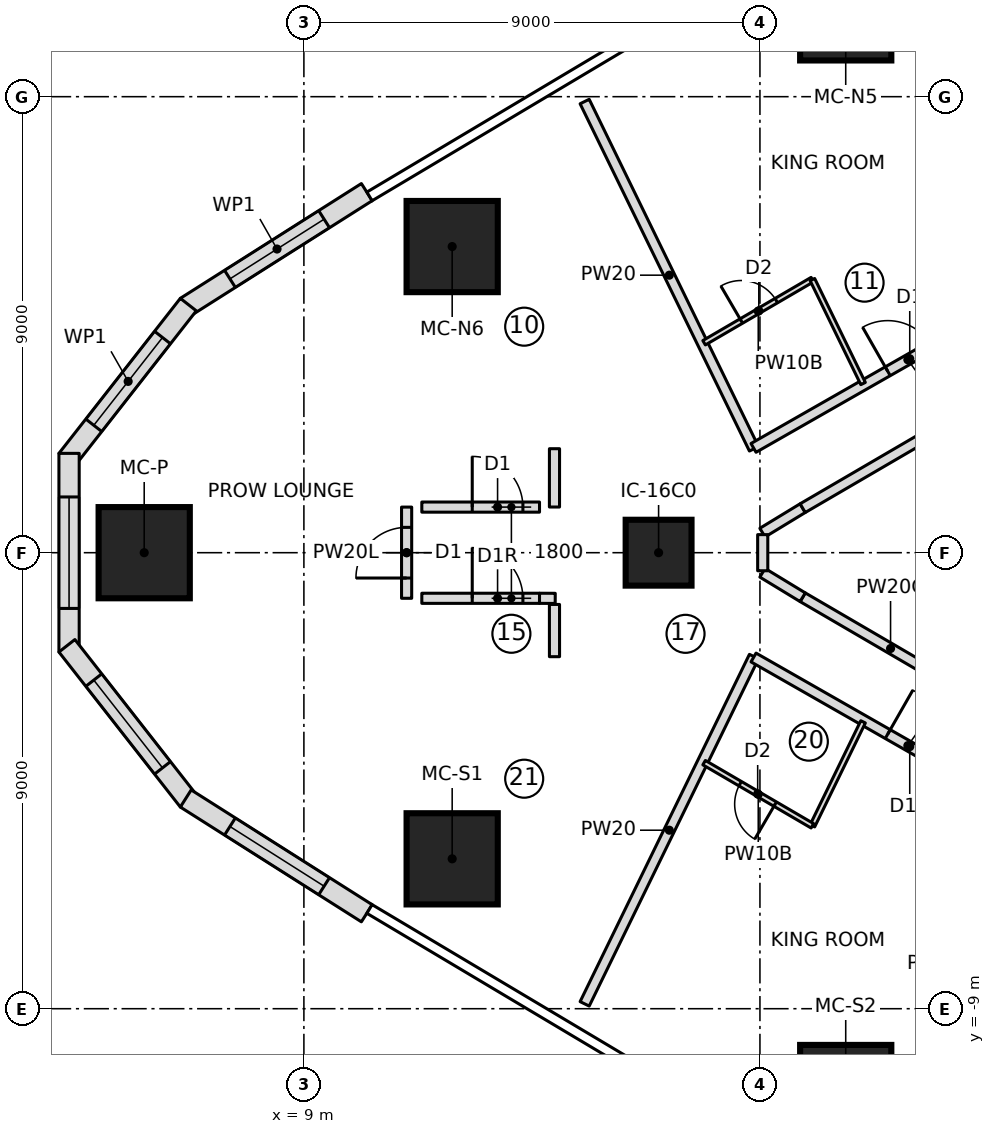
"""IFC4 building model, lengths in metres.
Left out: names, types, materials, properties, quantities, classifications, styles, units other than length and angle.
Written with IfcOpenShell. Run it as: python <this file> out.ifc"""

import sys

from ifc_helpers import new_model, si_unit, direction, frame, frame_2d, origin, origin_2d, place, context, subcontext, project, spatial, polyline, rectangle, outline, extrude, element, fill, save


model = new_model("IFC4")
c1 = context("Model", 3, precision=1e-05, world=origin(), true_north=direction((0.0, 1.0)))
c2 = subcontext(c1, "Body", "Model", "MODEL_VIEW")
j1 = project(units=[si_unit("LENGTHUNIT", "METRE"), si_unit("PLANEANGLEUNIT", "RADIAN")], contexts=[c1])
p1 = place(None, origin())
s1 = spatial("IfcSite", under=j1, at=p1, CompositionType="ELEMENT")
p2 = place(p1, origin())
s2 = spatial("IfcBuilding", under=s1, at=p2, CompositionType="ELEMENT")
p3 = place(p2, frame((0.0, 0.0, 68.0)))
s3 = spatial("IfcBuildingStorey", under=s2, at=p3, CompositionType="ELEMENT", Elevation=68.0)
for number, where, z_axis, x_axis in (
    (1, (5.848, 0.0, 0.0), (0.0, 0.0, 1.0), (1.0, 0.0, 0.0)),
    (2, (11.927, -6.042, 0.0), (0.0, 0.0, 1.0), (1.0, 0.0, 0.0)),
    (3, (19.693, -10.615, 0.0), (0.0, 0.0, 1.0), (1.0, 0.0, 0.0)),
    (4, (19.693, 10.615, 0.0), (0.0, 0.0, 1.0), (1.0, 0.0, 0.0)),
    (5, (11.927, 6.042, 0.0), (0.0, 0.0, 1.0), (1.0, 0.0, 0.0)),
):
    element("IfcColumn", number, at=place(p3, frame(where, z_axis=z_axis, x_axis=x_axis)), inside=s3, PredefinedType="COLUMN", context=c2, shape_type="SweptSolid", body=[
        extrude(rectangle(XDim=1.8, YDim=1.8, at=origin_2d()), origin(), (0.0, 0.0, 1.0), 3.55),
    ])
p4 = place(p3, frame((16.0, 0.0, 0.0), z_axis=(0.0, 0.0, 1.0), x_axis=(1.0, 0.0, 0.0)))
e6 = element("IfcColumn", 6, at=p4, inside=s3, PredefinedType="COLUMN", context=c2, shape_type="SweptSolid", body=[
    extrude(rectangle(XDim=1.3, YDim=1.3, at=origin_2d()), origin(), (0.0, 0.0, 1.0), 3.55),
])
p5 = place(p3, frame((10.242, 7.116, 0.0), z_axis=(0.0, 0.0, 1.0), x_axis=(-0.844551578623, -0.535474211372, 0.0)))
e7 = element("IfcWall", 7, at=p5, inside=s3, PredefinedType="NOTDEFINED", context=c2, shape_type="SweptSolid", body=[
    extrude(outline(polyline([(0.0, -0.2), (4.23, -0.2), (4.162, 0.2), (0.0, 0.2), (0.0, -0.2)])), origin(), (0.0, 0.0, 1.0), 3.25),
])
p6 = place(p5, frame((0.998, 0.0, 0.6)))
e8 = element("IfcOpeningElement", 8, at=p6, cuts=e7, PredefinedType="OPENING", context=c2, shape_type="SweptSolid", body=[
    extrude(outline(polyline([(0.0, 1.35), (0.084, 1.771), (0.322, 2.128), (0.679, 2.366), (1.1, 2.45), (1.521, 2.366), (1.878, 2.128), (2.116, 1.771), (2.2, 1.35), (2.2, 1.1), (2.116, 0.679), (1.878, 0.322), (1.521, 0.084), (1.1, 0.0), (0.679, 0.084), (0.322, 0.322), (0.084, 0.679), (0.0, 1.1), (0.0, 1.35)])), frame((0.0, 0.21, 0.0), z_axis=(0.0, -1.0, 0.0), x_axis=(1.0, 0.0, 0.0)), (0.0, 0.0, 1.0), 0.42),
])
p7 = place(p3, frame((6.698, 4.87, 0.0), z_axis=(0.0, 0.0, 1.0), x_axis=(-0.616586647779, -0.787287054245, 0.0)))
e9 = element("IfcWall", 9, at=p7, inside=s3, PredefinedType="NOTDEFINED", context=c2, shape_type="SweptSolid", body=[
    extrude(outline(polyline([(-0.034, -0.2), (3.852, -0.2), (3.714, 0.2), (0.034, 0.2), (-0.034, -0.2)])), origin(), (0.0, 0.0, 1.0), 3.25),
])
p8 = place(p7, frame((0.792, 0.0, 0.6)))
e10 = element("IfcOpeningElement", 10, at=p8, cuts=e9, PredefinedType="OPENING", context=c2, shape_type="SweptSolid", body=[
    extrude(outline(polyline([(0.0, 1.35), (0.084, 1.771), (0.322, 2.128), (0.679, 2.366), (1.1, 2.45), (1.521, 2.366), (1.878, 2.128), (2.116, 1.771), (2.2, 1.35), (2.2, 1.1), (2.116, 0.679), (1.878, 0.322), (1.521, 0.084), (1.1, 0.0), (0.679, 0.084), (0.322, 0.322), (0.084, 0.679), (0.0, 1.1), (0.0, 1.35)])), frame((0.0, 0.21, 0.0), z_axis=(0.0, -1.0, 0.0), x_axis=(1.0, 0.0, 0.0)), (0.0, 0.0, 1.0), 0.42),
])
p9 = place(p3, frame((4.365, 1.891, 0.0), z_axis=(0.0, 0.0, 1.0), x_axis=(0.0, -1.0, 0.0)))
e11 = element("IfcWall", 11, at=p9, inside=s3, PredefinedType="NOTDEFINED", context=c2, shape_type="SweptSolid", body=[
    extrude(outline(polyline([(-0.069, -0.2), (3.852, -0.2), (3.714, 0.2), (0.069, 0.2), (-0.069, -0.2)])), origin(), (0.0, 0.0, 1.0), 3.25),
])
p10 = place(p9, frame((0.792, 0.0, 0.6)))
e12 = element("IfcOpeningElement", 12, at=p10, cuts=e11, PredefinedType="OPENING", context=c2, shape_type="SweptSolid", body=[
    extrude(outline(polyline([(0.0, 1.35), (0.084, 1.771), (0.322, 2.128), (0.679, 2.366), (1.1, 2.45), (1.521, 2.366), (1.878, 2.128), (2.116, 1.771), (2.2, 1.35), (2.2, 1.1), (2.116, 0.679), (1.878, 0.322), (1.521, 0.084), (1.1, 0.0), (0.679, 0.084), (0.322, 0.322), (0.084, 0.679), (0.0, 1.1), (0.0, 1.35)])), frame((0.0, 0.21, 0.0), z_axis=(0.0, -1.0, 0.0), x_axis=(1.0, 0.0, 0.0)), (0.0, 0.0, 1.0), 0.42),
])
p11 = place(p3, frame((4.365, -1.891, 0.0), z_axis=(0.0, 0.0, 1.0), x_axis=(0.616586647779, -0.787287054245, 0.0)))
e13 = element("IfcWall", 13, at=p11, inside=s3, PredefinedType="NOTDEFINED", context=c2, shape_type="SweptSolid", body=[
    extrude(outline(polyline([(-0.069, -0.2), (3.817, -0.2), (3.749, 0.2), (0.069, 0.2), (-0.069, -0.2)])), origin(), (0.0, 0.0, 1.0), 3.25),
])
p12 = place(p11, frame((0.792, 0.0, 0.6)))
e14 = element("IfcOpeningElement", 14, at=p12, cuts=e13, PredefinedType="OPENING", context=c2, shape_type="SweptSolid", body=[
    extrude(outline(polyline([(0.0, 1.35), (0.084, 1.771), (0.322, 2.128), (0.679, 2.366), (1.1, 2.45), (1.521, 2.366), (1.878, 2.128), (2.116, 1.771), (2.2, 1.35), (2.2, 1.1), (2.116, 0.679), (1.878, 0.322), (1.521, 0.084), (1.1, 0.0), (0.679, 0.084), (0.322, 0.322), (0.084, 0.679), (0.0, 1.1), (0.0, 1.35)])), frame((0.0, 0.21, 0.0), z_axis=(0.0, -1.0, 0.0), x_axis=(1.0, 0.0, 0.0)), (0.0, 0.0, 1.0), 0.42),
])
p13 = place(p3, frame((6.698, -4.87, 0.0), z_axis=(0.0, 0.0, 1.0), x_axis=(0.844551578623, -0.535474211372, 0.0)))
e15 = element("IfcWall", 15, at=p13, inside=s3, PredefinedType="NOTDEFINED", context=c2, shape_type="SweptSolid", body=[
    extrude(outline(polyline([(-0.034, -0.2), (4.196, -0.2), (4.196, 0.2), (0.034, 0.2), (-0.034, -0.2)])), origin(), (0.0, 0.0, 1.0), 3.25),
])
p14 = place(p13, frame((0.998, 0.0, 0.6)))
e16 = element("IfcOpeningElement", 16, at=p14, cuts=e15, PredefinedType="OPENING", context=c2, shape_type="SweptSolid", body=[
    extrude(outline(polyline([(0.0, 1.35), (0.084, 1.771), (0.322, 2.128), (0.679, 2.366), (1.1, 2.45), (1.521, 2.366), (1.878, 2.128), (2.116, 1.771), (2.2, 1.35), (2.2, 1.1), (2.116, 0.679), (1.878, 0.322), (1.521, 0.084), (1.1, 0.0), (0.679, 0.084), (0.322, 0.322), (0.084, 0.679), (0.0, 1.1), (0.0, 1.35)])), frame((0.0, 0.21, 0.0), z_axis=(0.0, -1.0, 0.0), x_axis=(1.0, 0.0, 0.0)), (0.0, 0.0, 1.0), 0.42),
])
p15 = place(p3, frame((11.027, -0.9, 0.0), z_axis=(0.0, 0.0, 1.0), x_axis=(0.0, 1.0, 0.0)))
e17 = element("IfcWall", 17, at=p15, inside=s3, PredefinedType="PARTITIONING", context=c2, shape_type="SweptSolid", body=[
    extrude(rectangle(XDim=1.8, YDim=0.2, at=frame_2d((0.9, 0.0))), origin(), (0.0, 0.0, 1.0), 3.25),
])
p16 = place(p15, frame((0.4, 0.0, 0.0)))
e18 = element("IfcOpeningElement", 18, at=p16, cuts=e17, PredefinedType="OPENING", context=c2, shape_type="SweptSolid", body=[
    extrude(rectangle(XDim=1.0, YDim=2.1, at=frame_2d((0.5, 1.05))), frame((0.0, 0.11, 0.0), z_axis=(0.0, -1.0, 0.0), x_axis=(1.0, 0.0, 0.0)), (0.0, 0.0, 1.0), 0.22),
])
p17 = place(p3, frame((17.882, 2.05, 0.0), z_axis=(0.0, 0.0, 1.0), x_axis=(-0.438213564788, 0.898870887078, 0.0)))
e19 = element("IfcWall", 19, at=p17, inside=s3, PredefinedType="PARTITIONING", context=c2, shape_type="SweptSolid", body=[
    extrude(rectangle(XDim=7.625, YDim=0.2, at=frame_2d((3.813, 0.0))), origin(), (0.0, 0.0, 1.0), 3.25),
])
p18 = place(p3, frame((17.874, 2.068, 0.0), z_axis=(0.0, 0.0, 1.0), x_axis=(0.868427275315, 0.495816566373, 0.0)))
e20 = element("IfcWall", 20, at=p18, inside=s3, PredefinedType="PARTITIONING", context=c2, shape_type="SweptSolid", body=[
    extrude(rectangle(XDim=7.015, YDim=0.2, at=frame_2d((3.507, 0.0))), origin(), (0.0, 0.0, 1.0), 3.25),
])
p19 = place(p18, frame((3.05, 0.0, 0.0)))
e21 = element("IfcOpeningElement", 21, at=p19, cuts=e20, PredefinedType="OPENING", context=c2, shape_type="SweptSolid", body=[
    extrude(rectangle(XDim=1.0, YDim=2.1, at=frame_2d((0.5, 1.05))), frame((0.0, 0.11, 0.0), z_axis=(0.0, -1.0, 0.0), x_axis=(1.0, 0.0, 0.0)), (0.0, 0.0, 1.0), 0.22),
])
p20 = place(p3, frame((16.898, 4.144, 0.0), z_axis=(0.0, 0.0, 1.0), x_axis=(0.863707305865, 0.503993739837, 0.0)))
e22 = element("IfcWall", 22, at=p20, inside=s3, PredefinedType="PARTITIONING", context=c2, shape_type="SweptSolid", body=[
    extrude(rectangle(XDim=2.474, YDim=0.1, at=frame_2d((1.237, 0.0))), origin(), (0.0, 0.0, 1.0), 3.25),
])
p21 = place(p20, frame((0.85, 0.0, 0.0)))
e23 = element("IfcOpeningElement", 23, at=p21, cuts=e22, PredefinedType="OPENING", context=c2, shape_type="SweptSolid", body=[
    extrude(rectangle(XDim=0.8, YDim=2.1, at=frame_2d((0.4, 1.05))), frame((0.0, 0.06, 0.0), z_axis=(0.0, -1.0, 0.0), x_axis=(1.0, 0.0, 0.0)), (0.0, 0.0, 1.0), 0.12),
])
p22 = place(p3, frame((19.035, 5.39, 0.0), z_axis=(0.0, 0.0, 1.0), x_axis=(0.438122322582, -0.898915363344, 0.0)))
e24 = element("IfcWall", 24, at=p22, inside=s3, PredefinedType="PARTITIONING", context=c2, shape_type="SweptSolid", body=[
    extrude(rectangle(XDim=2.283, YDim=0.1, at=frame_2d((1.142, 0.0))), origin(), (0.0, 0.0, 1.0), 3.25),
])
p23 = place(p3, frame((23.965, 5.546, 0.0), z_axis=(0.0, 0.0, 1.0), x_axis=(-0.438184754816, 0.898884931816, 0.0)))
e25 = element("IfcWall", 25, at=p23, inside=s3, PredefinedType="PARTITIONING", context=c2, shape_type="SweptSolid", body=[
    extrude(rectangle(XDim=7.612, YDim=0.2, at=frame_2d((3.806, 0.0))), origin(), (0.0, 0.0, 1.0), 3.25),
])
p24 = place(p3, frame((14.541, -8.904, 0.0), z_axis=(0.0, 0.0, 1.0), x_axis=(0.438213564788, 0.898870887078, 0.0)))
e26 = element("IfcWall", 26, at=p24, inside=s3, PredefinedType="PARTITIONING", context=c2, shape_type="SweptSolid", body=[
    extrude(rectangle(XDim=7.625, YDim=0.2, at=frame_2d((3.813, 0.0))), origin(), (0.0, 0.0, 1.0), 3.25),
])
p25 = place(p3, frame((17.874, -2.068, 0.0), z_axis=(0.0, 0.0, 1.0), x_axis=(0.868427275315, -0.495816566373, 0.0)))
e27 = element("IfcWall", 27, at=p25, inside=s3, PredefinedType="PARTITIONING", context=c2, shape_type="SweptSolid", body=[
    extrude(rectangle(XDim=7.015, YDim=0.2, at=frame_2d((3.507, 0.0))), origin(), (0.0, 0.0, 1.0), 3.25),
])
p26 = place(p25, frame((3.05, 0.0, 0.0)))
e28 = element("IfcOpeningElement", 28, at=p26, cuts=e27, PredefinedType="OPENING", context=c2, shape_type="SweptSolid", body=[
    extrude(rectangle(XDim=1.0, YDim=2.1, at=frame_2d((0.5, 1.05))), frame((0.0, 0.11, 0.0), z_axis=(0.0, -1.0, 0.0), x_axis=(1.0, 0.0, 0.0)), (0.0, 0.0, 1.0), 0.22),
])
p27 = place(p3, frame((20.035, -3.338, 0.0), z_axis=(0.0, 0.0, 1.0), x_axis=(-0.438122322582, -0.898915363344, 0.0)))
e29 = element("IfcWall", 29, at=p27, inside=s3, PredefinedType="PARTITIONING", context=c2, shape_type="SweptSolid", body=[
    extrude(rectangle(XDim=2.283, YDim=0.1, at=frame_2d((1.142, 0.0))), origin(), (0.0, 0.0, 1.0), 3.25),
])
p28 = place(p3, frame((19.035, -5.39, 0.0), z_axis=(0.0, 0.0, 1.0), x_axis=(-0.863707305865, 0.503993739837, 0.0)))
e30 = element("IfcWall", 30, at=p28, inside=s3, PredefinedType="PARTITIONING", context=c2, shape_type="SweptSolid", body=[
    extrude(rectangle(XDim=2.474, YDim=0.1, at=frame_2d((1.237, 0.0))), origin(), (0.0, 0.0, 1.0), 3.25),
])
p29 = place(p28, frame((0.85, 0.0, 0.0)))
e31 = element("IfcOpeningElement", 31, at=p29, cuts=e30, PredefinedType="OPENING", context=c2, shape_type="SweptSolid", body=[
    extrude(rectangle(XDim=0.8, YDim=2.1, at=frame_2d((0.4, 1.05))), frame((0.0, 0.06, 0.0), z_axis=(0.0, -1.0, 0.0), x_axis=(1.0, 0.0, 0.0)), (0.0, 0.0, 1.0), 0.12),
])
p30 = place(p3, frame((20.63, -12.388, 0.0), z_axis=(0.0, 0.0, 1.0), x_axis=(0.438184754816, 0.898884931816, 0.0)))
e32 = element("IfcWall", 32, at=p30, inside=s3, PredefinedType="PARTITIONING", context=c2, shape_type="SweptSolid", body=[
    extrude(rectangle(XDim=7.612, YDim=0.2, at=frame_2d((3.806, 0.0))), origin(), (0.0, 0.0, 1.0), 3.25),
])
p31 = place(p3, frame((22.312, -2.903, 0.0), z_axis=(0.0, 0.0, 1.0), x_axis=(-0.863710538269, 0.503988200341, 0.0)))
e33 = element("IfcWall", 33, at=p31, inside=s3, PredefinedType="PARTITIONING", context=c2, shape_type="SweptSolid", body=[
    extrude(rectangle(XDim=4.016, YDim=0.2, at=frame_2d((2.008, 0.0))), origin(), (0.0, 0.0, 1.0), 3.25),
])
for number, where, z_axis, x_axis in (
    (34, (18.844, -0.879, 0.0), (0.0, 0.0, 1.0), (-0.854, 0.52, 0.0)),
    (35, (18.05, 0.396, 0.0), (0.0, 0.0, 1.0), (0.854, 0.52, 0.0)),
):
    element("IfcWall", number, at=place(p3, frame(where, z_axis=z_axis, x_axis=x_axis)), inside=s3, PredefinedType="PARTITIONING", context=c2, shape_type="SweptSolid", body=[
        extrude(rectangle(XDim=0.929, YDim=0.2, at=frame_2d((0.464, 0.0))), origin(), (0.0, 0.0, 1.0), 3.25),
    ])
p32 = place(p3, frame((18.844, 0.879, 0.0), z_axis=(0.0, 0.0, 1.0), x_axis=(0.863710538269, 0.503988200341, 0.0)))
e36 = element("IfcWall", 36, at=p32, inside=s3, PredefinedType="PARTITIONING", context=c2, shape_type="SweptSolid", body=[
    extrude(rectangle(XDim=4.016, YDim=0.2, at=frame_2d((2.008, 0.0))), origin(), (0.0, 0.0, 1.0), 3.25),
])
p33 = place(p3, frame((11.327, 0.9, 0.0), z_axis=(0.0, 0.0, 1.0), x_axis=(1.0, 0.0, 0.0)))
e37 = element("IfcWall", 37, at=p33, inside=s3, PredefinedType="PARTITIONING", context=c2, shape_type="SweptSolid", body=[
    extrude(rectangle(XDim=2.323, YDim=0.2, at=frame_2d((1.161, 0.0))), origin(), (0.0, 0.0, 1.0), 3.25),
])
p34 = place(p33, frame((0.995, 0.0, 0.0)))
e38 = element("IfcOpeningElement", 38, at=p34, cuts=e37, PredefinedType="OPENING", context=c2, shape_type="SweptSolid", body=[
    extrude(rectangle(XDim=1.0, YDim=2.1, at=frame_2d((0.5, 1.05))), frame((0.0, 0.11, 0.0), z_axis=(0.0, -1.0, 0.0), x_axis=(1.0, 0.0, 0.0)), (0.0, 0.0, 1.0), 0.22),
])
p35 = place(p3, frame((11.327, -0.9, 0.0), z_axis=(0.0, 0.0, 1.0), x_axis=(1.0, 0.0, 0.0)))
e39 = element("IfcWall", 39, at=p35, inside=s3, PredefinedType="PARTITIONING", context=c2, shape_type="SweptSolid", body=[
    extrude(rectangle(XDim=2.323, YDim=0.2, at=frame_2d((1.161, 0.0))), origin(), (0.0, 0.0, 1.0), 3.25),
])
p36 = place(p35, frame((0.995, 0.0, 0.0)))
e40 = element("IfcOpeningElement", 40, at=p36, cuts=e39, PredefinedType="OPENING", context=c2, shape_type="SweptSolid", body=[
    extrude(rectangle(XDim=1.0, YDim=2.1, at=frame_2d((0.5, 1.05))), frame((0.0, 0.11, 0.0), z_axis=(0.0, -1.0, 0.0), x_axis=(1.0, 0.0, 0.0)), (0.0, 0.0, 1.0), 0.22),
])
p37 = place(p3, frame((18.055, -0.357, 0.0), z_axis=(0.0, 0.0, 1.0), x_axis=(0.0, 1.0, 0.0)))
e41 = element("IfcWall", 41, at=p37, inside=s3, PredefinedType="PARTITIONING", context=c2, shape_type="SweptSolid", body=[
    extrude(rectangle(XDim=0.713, YDim=0.2, at=frame_2d((0.357, 0.0))), origin(), (0.0, 0.0, 1.0), 3.25),
])
p38 = place(p3, frame((13.946, 2.052, 0.0), z_axis=(0.0, 0.0, 1.0), x_axis=(-0.000424178117, -0.999999910036, 0.0)))
e42 = element("IfcWall", 42, at=p38, inside=s3, PredefinedType="PARTITIONING", context=c2, shape_type="SweptSolid", body=[
    extrude(rectangle(XDim=1.151, YDim=0.2, at=frame_2d((0.576, 0.0))), origin(), (0.0, 0.0, 1.0), 3.25),
])
p39 = place(p3, frame((13.65, -0.9, 0.0), z_axis=(0.0, 0.0, 1.0), x_axis=(0.999984810316, -0.005511727301, 0.0)))
e43 = element("IfcWall", 43, at=p39, inside=s3, PredefinedType="PARTITIONING", context=c2, shape_type="SweptSolid", body=[
    extrude(rectangle(XDim=0.31, YDim=0.2, at=frame_2d((0.155, 0.0))), origin(), (0.0, 0.0, 1.0), 3.25),
])
p40 = place(p3, frame((13.945, -1.021, 0.0), z_axis=(0.0, 0.0, 1.0), x_axis=(0.000473596916, -0.999999887853, 0.0)))
e44 = element("IfcWall", 44, at=p40, inside=s3, PredefinedType="PARTITIONING", context=c2, shape_type="SweptSolid", body=[
    extrude(rectangle(XDim=1.031, YDim=0.2, at=frame_2d((0.516, 0.0))), origin(), (0.0, 0.0, 1.0), 3.25),
])
p41 = place(p6, origin())
e45 = element("IfcWindow", 45, at=p41, inside=s3, PartitioningType="SINGLE_PANEL", PredefinedType="WINDOW", context=c2, shape_type="SweptSolid", body=[
    extrude(outline(polyline([(0.0, 1.35), (0.084, 1.771), (0.322, 2.128), (0.679, 2.366), (1.1, 2.45), (1.521, 2.366), (1.878, 2.128), (2.116, 1.771), (2.2, 1.35), (2.2, 1.1), (2.116, 0.679), (1.878, 0.322), (1.521, 0.084), (1.1, 0.0), (0.679, 0.084), (0.322, 0.322), (0.084, 0.679), (0.0, 1.1), (0.0, 1.35)])), frame((0.0, 0.17, 0.0), z_axis=(0.0, -1.0, 0.0), x_axis=(1.0, 0.0, 0.0)), (0.0, 0.0, 1.0), 0.06),
])
fill(e8, e45)
p42 = place(p8, origin())
e46 = element("IfcWindow", 46, at=p42, inside=s3, PartitioningType="SINGLE_PANEL", PredefinedType="WINDOW", context=c2, shape_type="SweptSolid", body=[
    extrude(outline(polyline([(0.0, 1.35), (0.084, 1.771), (0.322, 2.128), (0.679, 2.366), (1.1, 2.45), (1.521, 2.366), (1.878, 2.128), (2.116, 1.771), (2.2, 1.35), (2.2, 1.1), (2.116, 0.679), (1.878, 0.322), (1.521, 0.084), (1.1, 0.0), (0.679, 0.084), (0.322, 0.322), (0.084, 0.679), (0.0, 1.1), (0.0, 1.35)])), frame((0.0, 0.17, 0.0), z_axis=(0.0, -1.0, 0.0), x_axis=(1.0, 0.0, 0.0)), (0.0, 0.0, 1.0), 0.06),
])
fill(e10, e46)
p43 = place(p10, origin())
e47 = element("IfcWindow", 47, at=p43, inside=s3, PartitioningType="SINGLE_PANEL", PredefinedType="WINDOW", context=c2, shape_type="SweptSolid", body=[
    extrude(outline(polyline([(0.0, 1.35), (0.084, 1.771), (0.322, 2.128), (0.679, 2.366), (1.1, 2.45), (1.521, 2.366), (1.878, 2.128), (2.116, 1.771), (2.2, 1.35), (2.2, 1.1), (2.116, 0.679), (1.878, 0.322), (1.521, 0.084), (1.1, 0.0), (0.679, 0.084), (0.322, 0.322), (0.084, 0.679), (0.0, 1.1), (0.0, 1.35)])), frame((0.0, 0.17, 0.0), z_axis=(0.0, -1.0, 0.0), x_axis=(1.0, 0.0, 0.0)), (0.0, 0.0, 1.0), 0.06),
])
fill(e12, e47)
p44 = place(p12, origin())
e48 = element("IfcWindow", 48, at=p44, inside=s3, PartitioningType="SINGLE_PANEL", PredefinedType="WINDOW", context=c2, shape_type="SweptSolid", body=[
    extrude(outline(polyline([(0.0, 1.35), (0.084, 1.771), (0.322, 2.128), (0.679, 2.366), (1.1, 2.45), (1.521, 2.366), (1.878, 2.128), (2.116, 1.771), (2.2, 1.35), (2.2, 1.1), (2.116, 0.679), (1.878, 0.322), (1.521, 0.084), (1.1, 0.0), (0.679, 0.084), (0.322, 0.322), (0.084, 0.679), (0.0, 1.1), (0.0, 1.35)])), frame((0.0, 0.17, 0.0), z_axis=(0.0, -1.0, 0.0), x_axis=(1.0, 0.0, 0.0)), (0.0, 0.0, 1.0), 0.06),
])
fill(e14, e48)
p45 = place(p14, origin())
e49 = element("IfcWindow", 49, at=p45, inside=s3, PartitioningType="SINGLE_PANEL", PredefinedType="WINDOW", context=c2, shape_type="SweptSolid", body=[
    extrude(outline(polyline([(0.0, 1.35), (0.084, 1.771), (0.322, 2.128), (0.679, 2.366), (1.1, 2.45), (1.521, 2.366), (1.878, 2.128), (2.116, 1.771), (2.2, 1.35), (2.2, 1.1), (2.116, 0.679), (1.878, 0.322), (1.521, 0.084), (1.1, 0.0), (0.679, 0.084), (0.322, 0.322), (0.084, 0.679), (0.0, 1.1), (0.0, 1.35)])), frame((0.0, 0.17, 0.0), z_axis=(0.0, -1.0, 0.0), x_axis=(1.0, 0.0, 0.0)), (0.0, 0.0, 1.0), 0.06),
])
fill(e16, e49)
p46 = place(p34, origin())
e50 = element("IfcDoor", 50, at=p46, inside=s3, OperationType="SINGLE_SWING_LEFT", PredefinedType="DOOR", context=c2, shape_type="SweptSolid", body=[
    extrude(rectangle(XDim=1.0, YDim=2.1, at=frame_2d((0.5, 1.05))), frame((0.0, 0.025, 0.0), z_axis=(0.0, -1.0, 0.0), x_axis=(1.0, 0.0, 0.0)), (0.0, 0.0, 1.0), 0.05),
])
fill(e38, e50)
p47 = place(p36, origin())
e51 = element("IfcDoor", 51, at=p47, inside=s3, OperationType="SINGLE_SWING_RIGHT", PredefinedType="DOOR", context=c2, shape_type="SweptSolid", body=[
    extrude(rectangle(XDim=1.0, YDim=2.1, at=frame_2d((0.5, 1.05))), frame((0.0, 0.025, 0.0), z_axis=(0.0, -1.0, 0.0), x_axis=(1.0, 0.0, 0.0)), (0.0, 0.0, 1.0), 0.05),
])
fill(e40, e51)
p48 = place(p16, origin())
e52 = element("IfcDoor", 52, at=p48, inside=s3, OperationType="SINGLE_SWING_LEFT", PredefinedType="DOOR", context=c2, shape_type="SweptSolid", body=[
    extrude(rectangle(XDim=1.0, YDim=2.1, at=frame_2d((0.5, 1.05))), frame((0.0, 0.025, 0.0), z_axis=(0.0, -1.0, 0.0), x_axis=(1.0, 0.0, 0.0)), (0.0, 0.0, 1.0), 0.05),
])
fill(e18, e52)
p49 = place(p21, origin())
e53 = element("IfcDoor", 53, at=p49, inside=s3, OperationType="SINGLE_SWING_LEFT", PredefinedType="DOOR", context=c2, shape_type="SweptSolid", body=[
    extrude(rectangle(XDim=0.8, YDim=2.1, at=frame_2d((0.4, 1.05))), frame((0.0, 0.025, 0.0), z_axis=(0.0, -1.0, 0.0), x_axis=(1.0, 0.0, 0.0)), (0.0, 0.0, 1.0), 0.05),
])
fill(e23, e53)
p50 = place(p19, origin())
e54 = element("IfcDoor", 54, at=p50, inside=s3, OperationType="SINGLE_SWING_LEFT", PredefinedType="DOOR", context=c2, shape_type="SweptSolid", body=[
    extrude(rectangle(XDim=1.0, YDim=2.1, at=frame_2d((0.5, 1.05))), frame((0.0, 0.025, 0.0), z_axis=(0.0, -1.0, 0.0), x_axis=(1.0, 0.0, 0.0)), (0.0, 0.0, 1.0), 0.05),
])
fill(e21, e54)
p51 = place(p29, origin())
e55 = element("IfcDoor", 55, at=p51, inside=s3, OperationType="SINGLE_SWING_LEFT", PredefinedType="DOOR", context=c2, shape_type="SweptSolid", body=[
    extrude(rectangle(XDim=0.8, YDim=2.1, at=frame_2d((0.4, 1.05))), frame((0.0, 0.025, 0.0), z_axis=(0.0, -1.0, 0.0), x_axis=(1.0, 0.0, 0.0)), (0.0, 0.0, 1.0), 0.05),
])
fill(e31, e55)
p52 = place(p26, origin())
e56 = element("IfcDoor", 56, at=p52, inside=s3, OperationType="SINGLE_SWING_RIGHT", PredefinedType="DOOR", context=c2, shape_type="SweptSolid", body=[
    extrude(rectangle(XDim=1.0, YDim=2.1, at=frame_2d((0.5, 1.05))), frame((0.0, 0.025, 0.0), z_axis=(0.0, -1.0, 0.0), x_axis=(1.0, 0.0, 0.0)), (0.0, 0.0, 1.0), 0.05),
])
fill(e28, e56)
save(model, sys.argv[1])
